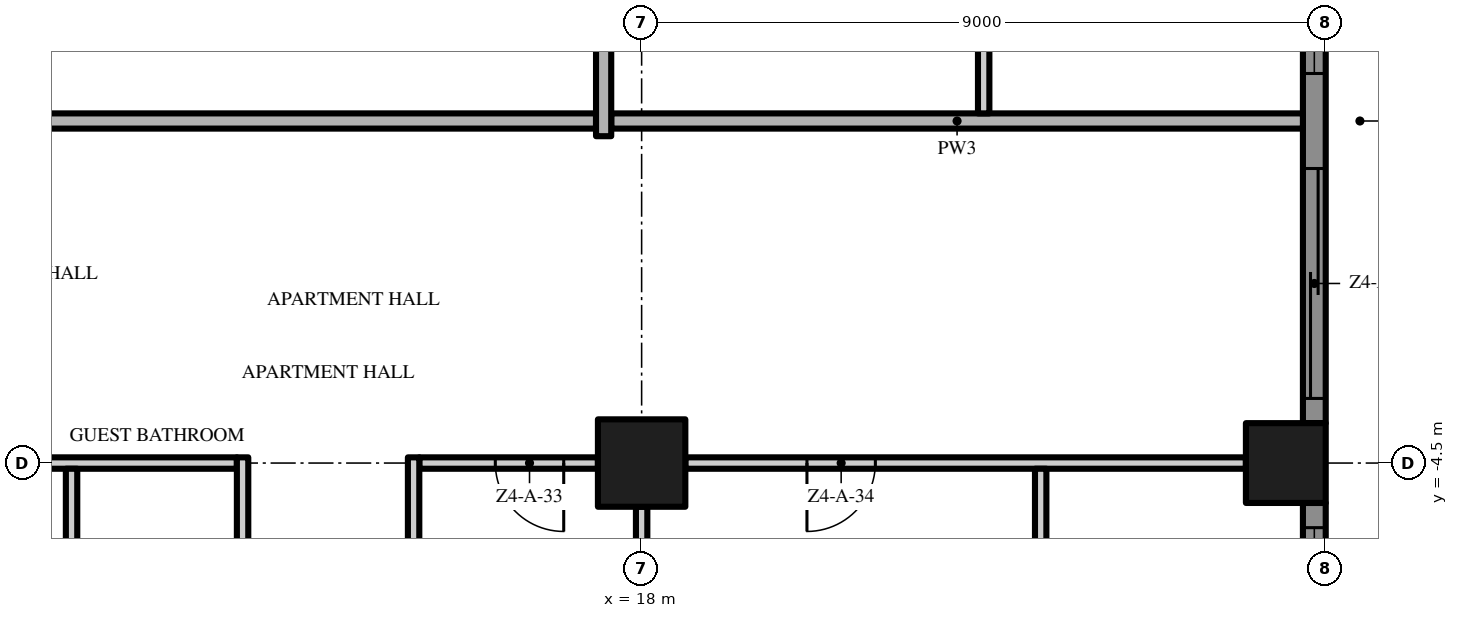
"""IFC4 building model, lengths in metres.
Left out: names, types, materials, properties, quantities, classifications, styles, units other than length and angle.
Written with IfcOpenShell. Run it as: python <this file> out.ifc"""

import sys

from ifc_helpers import new_model, si_unit, direction, frame, frame_2d, origin, origin_2d, place, context, subcontext, project, spatial, polyline, rectangle, outline, extrude, element, fill, save


model = new_model("IFC4")
c1 = context("Model", 3, precision=1e-05, world=origin(), true_north=direction((0.0, 1.0)))
c2 = subcontext(c1, "Body", "Model", "MODEL_VIEW")
j1 = project(units=[si_unit("LENGTHUNIT", "METRE"), si_unit("PLANEANGLEUNIT", "RADIAN")], contexts=[c1])
p1 = place(None, origin())
s1 = spatial("IfcSite", under=j1, at=p1, CompositionType="ELEMENT")
p2 = place(p1, origin())
s2 = spatial("IfcBuilding", under=s1, at=p2, CompositionType="ELEMENT")
p3 = place(p2, frame((0.0, 0.0, 188.2)))
s3 = spatial("IfcBuildingStorey", under=s2, at=p3, CompositionType="ELEMENT", Elevation=188.2)
p4 = place(p3, frame((18.0, -4.5, 0.0), z_axis=(0.0, 0.0, 1.0), x_axis=(1.0, 0.0, 0.0)))
e1 = element("IfcColumn", 1, at=p4, inside=s3, PredefinedType="COLUMN", context=c2, shape_type="SweptSolid", body=[
    extrude(rectangle(XDim=1.15, YDim=1.15, at=origin_2d()), origin(), (0.0, 0.0, 1.0), 3.5),
])
p5 = place(p3, frame((26.475, -4.5, 0.0), z_axis=(0.0, 0.0, 1.0), x_axis=(1.0, 0.0, 0.0)))
e2 = element("IfcColumn", 2, at=p5, inside=s3, PredefinedType="COLUMN", context=c2, shape_type="SweptSolid", body=[
    extrude(rectangle(XDim=1.05, YDim=1.05, at=origin_2d()), origin(), (0.0, 0.0, 1.0), 3.5),
])
p6 = place(p3, frame((26.85, -5.025, 0.0), z_axis=(0.0, 0.0, 1.0), x_axis=(0.0, -1.0, 0.0)))
e3 = element("IfcWall", 3, at=p6, inside=s3, PredefinedType="SOLIDWALL", context=c2, shape_type="SweptSolid", body=[
    extrude(rectangle(XDim=7.95, YDim=0.3, at=frame_2d((3.975, 0.0))), origin(), (0.0, 0.0, 1.0), 3.5),
])
p7 = place(p6, frame((4.6, 0.0, 0.45)))
e4 = element("IfcOpeningElement", 4, at=p7, cuts=e3, PredefinedType="OPENING", context=c2, shape_type="SweptSolid", body=[
    extrude(rectangle(XDim=3.025, YDim=2.65, at=frame_2d((1.512, 1.325))), frame((0.0, 0.16, 0.0), z_axis=(0.0, -1.0, 0.0), x_axis=(1.0, 0.0, 0.0)), (0.0, 0.0, 1.0), 0.32),
])
p8 = place(p6, frame((0.325, 0.0, 0.45)))
e5 = element("IfcOpeningElement", 5, at=p8, cuts=e3, PredefinedType="OPENING", context=c2, shape_type="SweptSolid", body=[
    extrude(rectangle(XDim=3.025, YDim=2.65, at=frame_2d((1.512, 1.325))), frame((0.0, 0.16, 0.0), z_axis=(0.0, -1.0, 0.0), x_axis=(1.0, 0.0, 0.0)), (0.0, 0.0, 1.0), 0.32),
])
p9 = place(p3, frame((26.85, 3.975, 0.0), z_axis=(0.0, 0.0, 1.0), x_axis=(0.0, -1.0, 0.0)))
e6 = element("IfcWall", 6, at=p9, inside=s3, PredefinedType="SOLIDWALL", context=c2, shape_type="SweptSolid", body=[
    extrude(rectangle(XDim=7.95, YDim=0.3, at=frame_2d((3.975, 0.0))), origin(), (0.0, 0.0, 1.0), 3.5),
])
p10 = place(p9, frame((4.6, 0.0, 0.0)))
e7 = element("IfcOpeningElement", 7, at=p10, cuts=e6, PredefinedType="OPENING", context=c2, shape_type="SweptSolid", body=[
    extrude(rectangle(XDim=3.025, YDim=2.4, at=frame_2d((1.512, 1.2))), frame((0.0, 0.16, 0.0), z_axis=(0.0, -1.0, 0.0), x_axis=(1.0, 0.0, 0.0)), (0.0, 0.0, 1.0), 0.32),
])
p11 = place(p9, frame((0.325, 0.0, 0.45)))
e8 = element("IfcOpeningElement", 8, at=p11, cuts=e6, PredefinedType="OPENING", context=c2, shape_type="SweptSolid", body=[
    extrude(rectangle(XDim=3.025, YDim=2.65, at=frame_2d((1.512, 1.325))), frame((0.0, 0.16, 0.0), z_axis=(0.0, -1.0, 0.0), x_axis=(1.0, 0.0, 0.0)), (0.0, 0.0, 1.0), 0.32),
])
p12 = place(p3, origin())
e9 = element("IfcWall", 9, at=p12, inside=s3, PredefinedType="USERDEFINED", context=c2, shape_type="SweptSolid", body=[
    extrude(outline(polyline([(30.0, -18.0), (29.771, -16.5), (29.171, -15.0), (28.429, -13.5), (27.829, -12.0), (27.6, -10.5), (27.829, -9.0), (28.429, -7.5), (29.171, -6.0), (29.771, -4.5), (30.0, -3.0), (29.771, -1.5), (29.171, 0.0), (28.429, 1.5), (27.829, 3.0), (27.6, 4.5), (27.829, 6.0), (28.429, 7.5), (29.171, 9.0), (29.771, 10.5), (30.0, 12.0), (29.771, 13.5), (29.171, 15.0), (28.429, 16.5), (27.829, 18.0), (27.597, 17.907), (28.201, 16.398), (28.942, 14.898), (29.528, 13.434), (29.747, 12.0), (29.528, 10.566), (28.942, 9.102), (28.201, 7.602), (27.586, 6.066), (27.347, 4.5), (27.586, 2.934), (28.201, 1.398), (28.942, -0.102), (29.528, -1.566), (29.747, -3.0), (29.528, -4.434), (28.942, -5.898), (28.201, -7.398), (27.586, -8.934), (27.347, -10.5), (27.586, -12.066), (28.201, -13.602), (28.942, -15.102), (29.528, -16.566), (29.753, -18.038), (30.0, -18.0)])), origin(), (0.0, 0.0, 1.0), 0.9),
])
p13 = place(p3, frame((9.575, -4.5, 0.0), z_axis=(0.0, 0.0, 1.0), x_axis=(1.0, 0.0, 0.0)))
e10 = element("IfcWall", 10, at=p13, inside=s3, PredefinedType="PARTITIONING", context=c2, shape_type="SweptSolid", body=[
    extrude(rectangle(XDim=3.1, YDim=0.15, at=frame_2d((1.55, 0.0))), origin(), (0.0, 0.0, 1.0), 3.5),
])
p14 = place(p3, frame((17.425, -4.5, 0.0), z_axis=(0.0, 0.0, 1.0), x_axis=(-1.0, 0.0, 0.0)))
e11 = element("IfcWall", 11, at=p14, inside=s3, PredefinedType="PARTITIONING", context=c2, shape_type="SweptSolid", body=[
    extrude(rectangle(XDim=2.35, YDim=0.15, at=frame_2d((1.175, 0.0))), origin(), (0.0, 0.0, 1.0), 3.5),
])
p15 = place(p14, frame((0.45, 0.0, 0.0)))
e12 = element("IfcOpeningElement", 12, at=p15, cuts=e11, PredefinedType="OPENING", context=c2, shape_type="SweptSolid", body=[
    extrude(rectangle(XDim=0.9, YDim=2.1, at=frame_2d((0.45, 1.05))), frame((0.0, 0.085, 0.0), z_axis=(0.0, -1.0, 0.0), x_axis=(1.0, 0.0, 0.0)), (0.0, 0.0, 1.0), 0.17),
])
p16 = place(p3, frame((25.95, -4.5, 0.0), z_axis=(0.0, 0.0, 1.0), x_axis=(-1.0, 0.0, 0.0)))
e13 = element("IfcWall", 13, at=p16, inside=s3, PredefinedType="PARTITIONING", context=c2, shape_type="SweptSolid", body=[
    extrude(rectangle(XDim=7.375, YDim=0.15, at=frame_2d((3.688, 0.0))), origin(), (0.0, 0.0, 1.0), 3.5),
])
p17 = place(p16, frame((4.875, 0.0, 0.0)))
e14 = element("IfcOpeningElement", 14, at=p17, cuts=e13, PredefinedType="OPENING", context=c2, shape_type="SweptSolid", body=[
    extrude(rectangle(XDim=0.9, YDim=2.1, at=frame_2d((0.45, 1.05))), frame((0.0, 0.085, 0.0), z_axis=(0.0, -1.0, 0.0), x_axis=(1.0, 0.0, 0.0)), (0.0, 0.0, 1.0), 0.17),
])
p18 = place(p3, frame((17.4, 0.0, 0.0), z_axis=(0.0, 0.0, 1.0), x_axis=(-1.0, 0.0, 0.0)))
e15 = element("IfcWall", 15, at=p18, inside=s3, PredefinedType="PARTITIONING", context=c2, shape_type="SweptSolid", body=[
    extrude(rectangle(XDim=17.3, YDim=0.2, at=frame_2d((8.65, 0.0))), origin(), (0.0, 0.0, 1.0), 3.5),
])
p19 = place(p18, frame((7.65, 0.0, 0.0)))
e16 = element("IfcOpeningElement", 16, at=p19, cuts=e15, PredefinedType="OPENING", context=c2, shape_type="SweptSolid", body=[
    extrude(rectangle(XDim=1.5, YDim=2.4, at=frame_2d((0.75, 1.2))), frame((0.0, 0.11, 0.0), z_axis=(0.0, -1.0, 0.0), x_axis=(1.0, 0.0, 0.0)), (0.0, 0.0, 1.0), 0.22),
])
p20 = place(p3, frame((17.6, 0.0, 0.0), z_axis=(0.0, 0.0, 1.0), x_axis=(1.0, 0.0, 0.0)))
e17 = element("IfcWall", 17, at=p20, inside=s3, PredefinedType="PARTITIONING", context=c2, shape_type="SweptSolid", body=[
    extrude(rectangle(XDim=9.1, YDim=0.2, at=frame_2d((4.55, 0.0))), origin(), (0.0, 0.0, 1.0), 3.5),
])
p21 = place(p3, frame((10.5, -8.925, 0.0), z_axis=(0.0, 0.0, 1.0), x_axis=(0.0, 1.0, 0.0)))
e18 = element("IfcWall", 18, at=p21, inside=s3, PredefinedType="PARTITIONING", context=c2, shape_type="SweptSolid", body=[
    extrude(rectangle(XDim=4.35, YDim=0.15, at=frame_2d((2.175, 0.0))), origin(), (0.0, 0.0, 1.0), 3.5),
])
p22 = place(p3, frame((12.75, -8.925, 0.0), z_axis=(0.0, 0.0, 1.0), x_axis=(0.0, 1.0, 0.0)))
e19 = element("IfcWall", 19, at=p22, inside=s3, PredefinedType="PARTITIONING", context=c2, shape_type="SweptSolid", body=[
    extrude(rectangle(XDim=4.5, YDim=0.15, at=frame_2d((2.25, 0.0))), origin(), (0.0, 0.0, 1.0), 3.5),
])
p23 = place(p22, frame((1.75, 0.0, 0.0)))
e20 = element("IfcOpeningElement", 20, at=p23, cuts=e19, PredefinedType="OPENING", context=c2, shape_type="SweptSolid", body=[
    extrude(rectangle(XDim=0.9, YDim=2.1, at=frame_2d((0.45, 1.05))), frame((0.0, 0.085, 0.0), z_axis=(0.0, -1.0, 0.0), x_axis=(1.0, 0.0, 0.0)), (0.0, 0.0, 1.0), 0.17),
])
p24 = place(p3, frame((15.0, -9.075, 0.0), z_axis=(0.0, 0.0, 1.0), x_axis=(0.0, 1.0, 0.0)))
e21 = element("IfcWall", 21, at=p24, inside=s3, PredefinedType="PARTITIONING", context=c2, shape_type="SweptSolid", body=[
    extrude(rectangle(XDim=4.65, YDim=0.15, at=frame_2d((2.325, 0.0))), origin(), (0.0, 0.0, 1.0), 3.5),
])
p25 = place(p3, frame((17.5, -0.2, 0.0), z_axis=(0.0, 0.0, 1.0), x_axis=(0.0, 1.0, 0.0)))
e22 = element("IfcWall", 22, at=p25, inside=s3, PredefinedType="PARTITIONING", context=c2, shape_type="SweptSolid", body=[
    extrude(rectangle(XDim=4.125, YDim=0.2, at=frame_2d((2.062, 0.0))), origin(), (0.0, 0.0, 1.0), 3.5),
])
p26 = place(p3, frame((18.0, -8.925, 0.0), z_axis=(0.0, 0.0, 1.0), x_axis=(0.0, 1.0, 0.0)))
e23 = element("IfcWall", 23, at=p26, inside=s3, PredefinedType="PARTITIONING", context=c2, shape_type="SweptSolid", body=[
    extrude(rectangle(XDim=3.85, YDim=0.15, at=frame_2d((1.925, 0.0))), origin(), (0.0, 0.0, 1.0), 3.5),
])
p27 = place(p3, frame((22.5, 17.475, 0.0), z_axis=(0.0, 0.0, 1.0), x_axis=(0.0, -1.0, 0.0)))
e24 = element("IfcWall", 24, at=p27, inside=s3, PredefinedType="PARTITIONING", context=c2, shape_type="SweptSolid", body=[
    extrude(rectangle(XDim=17.375, YDim=0.15, at=frame_2d((8.688, 0.0))), origin(), (0.0, 0.0, 1.0), 3.5),
])
p28 = place(p27, frame((14.725, 0.0, 0.0)))
e25 = element("IfcOpeningElement", 25, at=p28, cuts=e24, PredefinedType="OPENING", context=c2, shape_type="SweptSolid", body=[
    extrude(rectangle(XDim=1.0, YDim=2.4, at=frame_2d((0.5, 1.2))), frame((0.0, 0.085, 0.0), z_axis=(0.0, -1.0, 0.0), x_axis=(1.0, 0.0, 0.0)), (0.0, 0.0, 1.0), 0.17),
])
p29 = place(p27, frame((9.125, 0.0, 0.0)))
e26 = element("IfcOpeningElement", 26, at=p29, cuts=e24, PredefinedType="OPENING", context=c2, shape_type="SweptSolid", body=[
    extrude(rectangle(XDim=1.0, YDim=2.4, at=frame_2d((0.5, 1.2))), frame((0.0, 0.085, 0.0), z_axis=(0.0, -1.0, 0.0), x_axis=(1.0, 0.0, 0.0)), (0.0, 0.0, 1.0), 0.17),
])
p30 = place(p27, frame((2.325, 0.0, 0.0)))
e27 = element("IfcOpeningElement", 27, at=p30, cuts=e24, PredefinedType="OPENING", context=c2, shape_type="SweptSolid", body=[
    extrude(rectangle(XDim=1.8, YDim=2.4, at=frame_2d((0.9, 1.2))), frame((0.0, 0.085, 0.0), z_axis=(0.0, -1.0, 0.0), x_axis=(1.0, 0.0, 0.0)), (0.0, 0.0, 1.0), 0.17),
])
p31 = place(p3, frame((23.25, -4.575, 0.0), z_axis=(0.0, 0.0, 1.0), x_axis=(0.0, -1.0, 0.0)))
e28 = element("IfcWall", 28, at=p31, inside=s3, PredefinedType="PARTITIONING", context=c2, shape_type="SweptSolid", body=[
    extrude(rectangle(XDim=4.35, YDim=0.15, at=frame_2d((2.175, 0.0))), origin(), (0.0, 0.0, 1.0), 3.5),
])
p32 = place(p31, frame((1.7, 0.0, 0.0)))
e29 = element("IfcOpeningElement", 29, at=p32, cuts=e28, PredefinedType="OPENING", context=c2, shape_type="SweptSolid", body=[
    extrude(rectangle(XDim=0.9, YDim=2.1, at=frame_2d((0.45, 1.05))), frame((0.0, 0.085, 0.0), z_axis=(0.0, -1.0, 0.0), x_axis=(1.0, 0.0, 0.0)), (0.0, 0.0, 1.0), 0.17),
])
p33 = place(p8, origin())
e30 = element("IfcWindow", 30, at=p33, inside=s3, PartitioningType="SINGLE_PANEL", PredefinedType="WINDOW", context=c2, shape_type="SweptSolid", body=[
    extrude(rectangle(XDim=3.025, YDim=2.65, at=frame_2d((1.512, 1.325))), frame((0.0, 0.03, 0.0), z_axis=(0.0, -1.0, 0.0), x_axis=(1.0, 0.0, 0.0)), (0.0, 0.0, 1.0), 0.06),
])
fill(e5, e30)
p34 = place(p10, origin())
e31 = element("IfcDoor", 31, at=p34, inside=s3, OperationType="SINGLE_SWING_LEFT", PredefinedType="DOOR", context=c2, shape_type="SweptSolid", body=[
    extrude(rectangle(XDim=3.025, YDim=2.4, at=frame_2d((1.512, 1.2))), frame((0.0, 0.025, 0.0), z_axis=(0.0, -1.0, 0.0), x_axis=(1.0, 0.0, 0.0)), (0.0, 0.0, 1.0), 0.05),
])
fill(e7, e31)
p35 = place(p11, origin())
e32 = element("IfcWindow", 32, at=p35, inside=s3, PartitioningType="SINGLE_PANEL", PredefinedType="WINDOW", context=c2, shape_type="SweptSolid", body=[
    extrude(rectangle(XDim=3.025, YDim=2.65, at=frame_2d((1.512, 1.325))), frame((0.0, 0.03, 0.0), z_axis=(0.0, -1.0, 0.0), x_axis=(1.0, 0.0, 0.0)), (0.0, 0.0, 1.0), 0.06),
])
fill(e8, e32)
p36 = place(p15, origin())
e33 = element("IfcDoor", 33, at=p36, inside=s3, OperationType="SINGLE_SWING_LEFT", PredefinedType="DOOR", context=c2, shape_type="SweptSolid", body=[
    extrude(rectangle(XDim=0.9, YDim=2.1, at=frame_2d((0.45, 1.05))), frame((0.0, 0.025, 0.0), z_axis=(0.0, -1.0, 0.0), x_axis=(1.0, 0.0, 0.0)), (0.0, 0.0, 1.0), 0.05),
])
fill(e12, e33)
p37 = place(p17, origin())
e34 = element("IfcDoor", 34, at=p37, inside=s3, OperationType="SINGLE_SWING_RIGHT", PredefinedType="DOOR", context=c2, shape_type="SweptSolid", body=[
    extrude(rectangle(XDim=0.9, YDim=2.1, at=frame_2d((0.45, 1.05))), frame((0.0, 0.025, 0.0), z_axis=(0.0, -1.0, 0.0), x_axis=(1.0, 0.0, 0.0)), (0.0, 0.0, 1.0), 0.05),
])
fill(e14, e34)
save(model, sys.argv[1])
